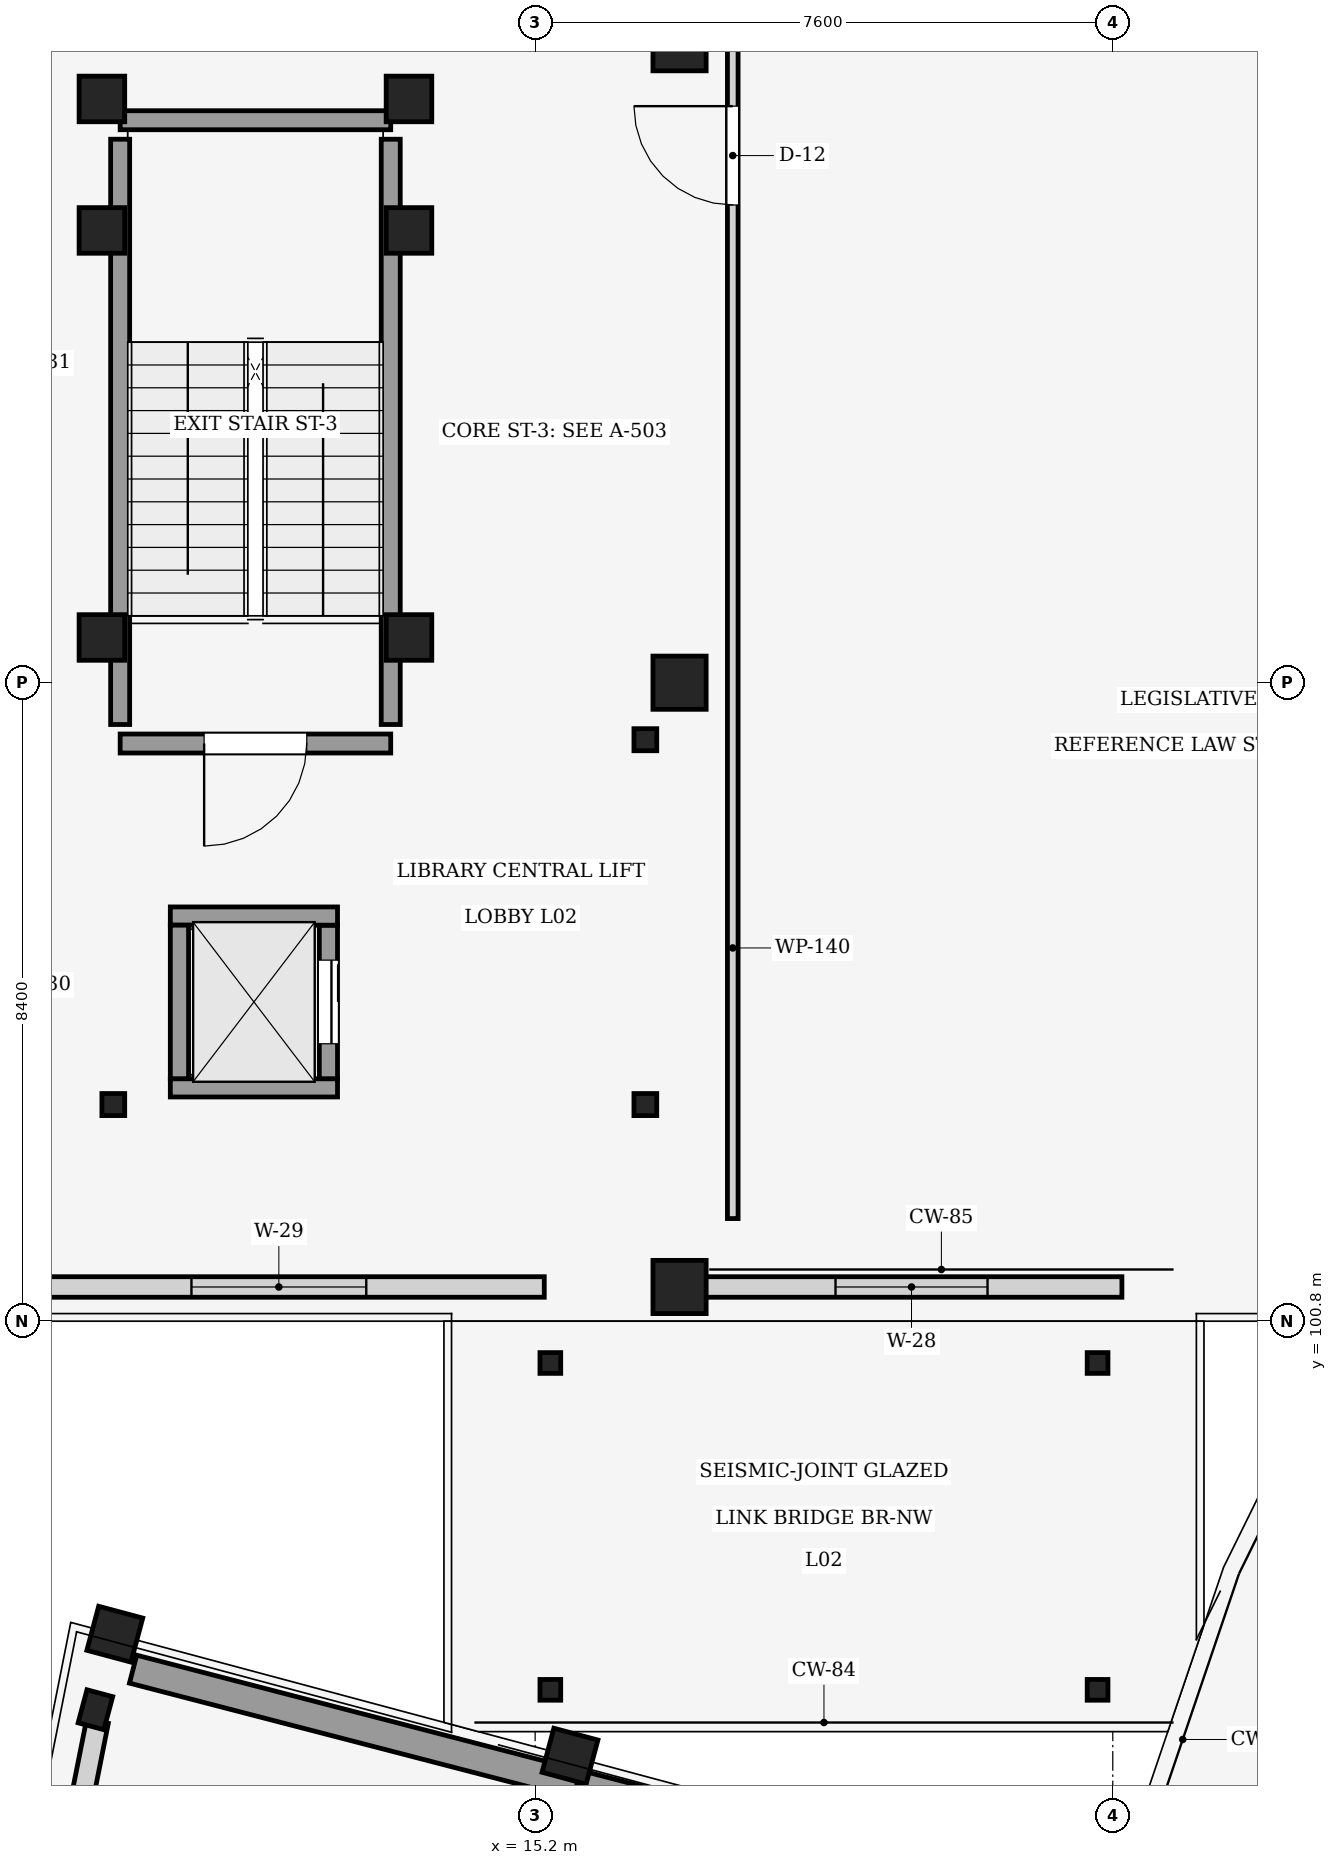
"""IFC4 building model, lengths in metres.
Left out: names, types, materials, properties, quantities, classifications, styles, units other than length and angle.
Written with IfcOpenShell. Run it as: python <this file> out.ifc"""

import sys

from ifc_helpers import new_model, si_unit, direction, frame, frame_2d, origin, origin_2d, place, context, subcontext, project, spatial, rectangle, hollow_circle, i_section, extrude, element, fill, save


model = new_model("IFC4")
c1 = context("Model", 3, precision=1e-05, world=origin(), true_north=direction((0.0, 1.0)))
c2 = subcontext(c1, "Body", "Model", "MODEL_VIEW")
j1 = project(units=[si_unit("LENGTHUNIT", "METRE"), si_unit("PLANEANGLEUNIT", "RADIAN")], contexts=[c1])
p1 = place(None, origin())
s1 = spatial("IfcSite", under=j1, at=p1, CompositionType="ELEMENT")
p2 = place(p1, origin())
s2 = spatial("IfcBuilding", under=s1, at=p2, CompositionType="ELEMENT")
p3 = place(p2, frame((0.0, 0.0, 9.15)))
s3 = spatial("IfcBuildingStorey", under=s2, at=p3, CompositionType="ELEMENT", Elevation=9.15)
for number, where, z_axis, x_axis in (
    (1, (15.658, 95.077, 0.0), (0.0, 0.0, 1.0), (-0.966, 0.259, 0.0)),
    (2, (9.67, 96.682, 0.0), (0.0, 0.0, 1.0), (-0.966, 0.259, 0.0)),
):
    element("IfcColumn", number, at=place(p3, frame(where, z_axis=z_axis, x_axis=x_axis)), inside=s3, PredefinedType="COLUMN", context=c2, shape_type="SweptSolid", body=[
        extrude(rectangle(XDim=0.6, YDim=0.6, at=origin_2d()), origin(), (0.0, 0.0, 1.0), 4.05),
    ])
p4 = place(p3, frame((9.414, 95.688, 0.0), z_axis=(0.0, 0.0, 1.0), x_axis=(-0.965925826289, 0.258819045103, 0.0)))
e3 = element("IfcColumn", 3, at=p4, inside=s3, PredefinedType="PILASTER", context=c2, shape_type="SweptSolid", body=[
    extrude(rectangle(XDim=0.35, YDim=0.45, at=origin_2d()), origin(), (0.0, 0.0, 1.0), 4.05),
])
for number, where, z_axis, x_axis in (
    (4, (17.1, 101.25, 0.0), (0.0, 0.0, 1.0), (1.0, 0.0, 0.0)),
    (5, (17.1, 109.2, 0.0), (0.0, 0.0, 1.0), (1.0, 0.0, 0.0)),
    (6, (17.1, 117.6, 0.0), (0.0, 0.0, 1.0), (1.0, 0.0, 0.0)),
):
    element("IfcColumn", number, at=place(p3, frame(where, z_axis=z_axis, x_axis=x_axis)), inside=s3, PredefinedType="COLUMN", context=c2, shape_type="SweptSolid", body=[
        extrude(rectangle(XDim=0.7, YDim=0.7, at=origin_2d()), origin(), (0.0, 0.0, 1.0), 4.05),
    ])
for number, where, z_axis, x_axis in (
    (7, (15.4, 95.95, 0.0), (0.0, 0.0, 1.0), (1.0, 0.0, 0.0)),
    (8, (22.6, 95.95, 0.0), (0.0, 0.0, 1.0), (1.0, 0.0, 0.0)),
    (9, (22.6, 100.25, 0.0), (0.0, 0.0, 1.0), (1.0, 0.0, 0.0)),
    (10, (15.4, 100.25, 0.0), (0.0, 0.0, 1.0), (1.0, 0.0, 0.0)),
):
    element("IfcColumn", number, at=place(p3, frame(where, z_axis=z_axis, x_axis=x_axis)), inside=s3, PredefinedType="COLUMN", context=c2, shape_type="SweptSolid", body=[
        extrude(hollow_circle(Radius=0.136, WallThickness=0.016, at=origin_2d()), origin(), (0.0, 0.0, 1.0), 3.82),
    ])
for number, where, z_axis, x_axis in (
    (11, (13.54, 109.795, 0.0), (0.0, 0.0, 1.0), (1.0, 0.0, 0.0)),
    (12, (9.5, 109.795, 0.0), (0.0, 0.0, 1.0), (1.0, 0.0, 0.0)),
    (13, (13.54, 115.15, 0.0), (0.0, 0.0, 1.0), (1.0, 0.0, 0.0)),
    (14, (9.5, 115.15, 0.0), (0.0, 0.0, 1.0), (1.0, 0.0, 0.0)),
    (15, (13.54, 116.88, 0.0), (0.0, 0.0, 1.0), (1.0, 0.0, 0.0)),
    (16, (9.5, 116.88, 0.0), (0.0, 0.0, 1.0), (1.0, 0.0, 0.0)),
):
    element("IfcColumn", number, at=place(p3, frame(where, z_axis=z_axis, x_axis=x_axis)), inside=s3, PredefinedType="COLUMN", context=c2, shape_type="SweptSolid", body=[
        extrude(rectangle(XDim=0.6, YDim=0.6, at=origin_2d()), origin(), (0.0, 0.0, 1.0), 4.05),
    ])
for number, where, z_axis, x_axis in (
    (17, (9.65, 103.65, 0.0), (0.0, 0.0, 1.0), (1.0, 0.0, 0.0)),
    (18, (16.65, 103.65, 0.0), (0.0, 0.0, 1.0), (1.0, 0.0, 0.0)),
    (19, (16.65, 108.45, 0.0), (0.0, 0.0, 1.0), (1.0, 0.0, 0.0)),
):
    element("IfcColumn", number, at=place(p3, frame(where, z_axis=z_axis, x_axis=x_axis)), inside=s3, PredefinedType="COLUMN", context=c2, shape_type="SweptSolid", body=[
        extrude(i_section(OverallWidth=0.3, OverallDepth=0.29, WebThickness=0.009, FlangeThickness=0.014, at=origin_2d()), origin(), (0.0, 0.0, 1.0), 4.05),
    ])
p5 = place(p3, frame((8.466, 90.631, 0.0), z_axis=(0.0, 0.0, 1.0), x_axis=(0.195083817114, 0.980786574286, 0.0)))
e20 = element("IfcWall", 20, at=p5, inside=s3, PredefinedType="STANDARD", context=c2, shape_type="SweptSolid", body=[
    extrude(rectangle(XDim=5.003, YDim=0.29, at=frame_2d((2.502, 0.0))), origin(), (0.0, 0.0, 1.0), 3.165),
])
p6 = place(p5, frame((1.927, 0.0, 0.85)))
e21 = element("IfcOpeningElement", 21, at=p6, cuts=e20, PredefinedType="OPENING", context=c2, shape_type="SweptSolid", body=[
    extrude(rectangle(XDim=1.15, YDim=1.5, at=frame_2d((0.575, 0.75))), frame((0.0, 0.155, 0.0), z_axis=(0.0, -1.0, 0.0), x_axis=(1.0, 0.0, 0.0)), (0.0, 0.0, 1.0), 0.31),
])
p7 = place(p3, frame((9.91, 96.222, 0.0), z_axis=(0.0, 0.0, 1.0), x_axis=(0.96792914822, -0.251223334956, 0.0)))
e22 = element("IfcWall", 22, at=p7, inside=s3, PredefinedType="SHEAR", context=c2, shape_type="SweptSolid", body=[
    extrude(rectangle(XDim=12.1, YDim=0.38, at=frame_2d((6.05, 0.0))), origin(), (0.0, 0.0, 1.0), 3.75),
])
p8 = place(p3, frame((22.92, 101.25, 0.0), z_axis=(0.0, 0.0, 1.0), x_axis=(-1.0, 0.0, 0.0)))
e23 = element("IfcWall", 23, at=p8, inside=s3, PredefinedType="STANDARD", context=c2, shape_type="SweptSolid", body=[
    extrude(rectangle(XDim=5.535, YDim=0.27, at=frame_2d((2.768, 0.0))), origin(), (0.0, 0.0, 1.0), 3.015),
])
p9 = place(p8, frame((1.768, 0.0, 0.85)))
e24 = element("IfcOpeningElement", 24, at=p9, cuts=e23, PredefinedType="OPENING", context=c2, shape_type="SweptSolid", body=[
    extrude(rectangle(XDim=2.0, YDim=1.85, at=frame_2d((1.0, 0.925))), frame((0.0, 0.145, 0.0), z_axis=(0.0, -1.0, 0.0), x_axis=(1.0, 0.0, 0.0)), (0.0, 0.0, 1.0), 0.29),
])
p10 = place(p3, frame((15.32, 101.25, 0.0), z_axis=(0.0, 0.0, 1.0), x_axis=(-1.0, 0.0, 0.0)))
e25 = element("IfcWall", 25, at=p10, inside=s3, PredefinedType="STANDARD", context=c2, shape_type="SweptSolid", body=[
    extrude(rectangle(XDim=6.985, YDim=0.27, at=frame_2d((3.493, 0.0))), origin(), (0.0, 0.0, 1.0), 3.015),
])
p11 = place(p10, frame((2.342, 0.0, 0.85)))
e26 = element("IfcOpeningElement", 26, at=p11, cuts=e25, PredefinedType="OPENING", context=c2, shape_type="SweptSolid", body=[
    extrude(rectangle(XDim=2.3, YDim=1.85, at=frame_2d((1.15, 0.925))), frame((0.0, 0.145, 0.0), z_axis=(0.0, -1.0, 0.0), x_axis=(1.0, 0.0, 0.0)), (0.0, 0.0, 1.0), 0.29),
])
p12 = place(p3, frame((13.3, 108.4, 0.0), z_axis=(0.0, 0.0, 1.0), x_axis=(-1.0, 0.0, 0.0)))
e27 = element("IfcWall", 27, at=p12, inside=s3, PredefinedType="SHEAR", context=c2, shape_type="SweptSolid", body=[
    extrude(rectangle(XDim=3.56, YDim=0.25, at=frame_2d((1.78, 0.0))), origin(), (0.0, 0.0, 1.0), 4.05),
])
p13 = place(p12, frame((1.105, 0.0, 0.0)))
e28 = element("IfcOpeningElement", 28, at=p13, cuts=e27, PredefinedType="OPENING", context=c2, shape_type="SweptSolid", body=[
    extrude(rectangle(XDim=1.35, YDim=2.2, at=frame_2d((0.675, 1.1))), frame((0.0, 0.135, 0.0), z_axis=(0.0, -1.0, 0.0), x_axis=(1.0, 0.0, 0.0)), (0.0, 0.0, 1.0), 0.27),
])
p14 = place(p3, frame((9.74, 108.65, 0.0), z_axis=(0.0, 0.0, 1.0), x_axis=(0.0, 1.0, 0.0)))
e29 = element("IfcWall", 29, at=p14, inside=s3, PredefinedType="SHEAR", context=c2, shape_type="SweptSolid", body=[
    extrude(rectangle(XDim=7.7, YDim=0.25, at=frame_2d((3.85, 0.0))), origin(), (0.0, 0.0, 1.0), 4.05),
])
p15 = place(p3, frame((9.74, 116.6, 0.0), z_axis=(0.0, 0.0, 1.0), x_axis=(1.0, 0.0, 0.0)))
e30 = element("IfcWall", 30, at=p15, inside=s3, PredefinedType="SHEAR", context=c2, shape_type="SweptSolid", body=[
    extrude(rectangle(XDim=3.56, YDim=0.25, at=frame_2d((1.78, 0.0))), origin(), (0.0, 0.0, 1.0), 4.05),
])
p16 = place(p3, frame((13.3, 116.35, 0.0), z_axis=(0.0, 0.0, 1.0), x_axis=(0.0, -1.0, 0.0)))
e31 = element("IfcWall", 31, at=p16, inside=s3, PredefinedType="SHEAR", context=c2, shape_type="SweptSolid", body=[
    extrude(rectangle(XDim=7.7, YDim=0.25, at=frame_2d((3.85, 0.0))), origin(), (0.0, 0.0, 1.0), 4.05),
])
p17 = place(p3, frame((12.6, 103.87, 0.0), z_axis=(0.0, 0.0, 1.0), x_axis=(-1.0, 0.0, 0.0)))
e32 = element("IfcWall", 32, at=p17, inside=s3, PredefinedType="SHEAR", context=c2, shape_type="SweptSolid", body=[
    extrude(rectangle(XDim=2.2, YDim=0.24, at=frame_2d((1.1, 0.0))), origin(), (0.0, 0.0, 1.0), 4.05),
])
p18 = place(p3, frame((12.48, 106.01, 0.0), z_axis=(0.0, 0.0, 1.0), x_axis=(0.0, -1.0, 0.0)))
e33 = element("IfcWall", 33, at=p18, inside=s3, PredefinedType="SHEAR", context=c2, shape_type="SweptSolid", body=[
    extrude(rectangle(XDim=2.02, YDim=0.24, at=frame_2d((1.01, 0.0))), origin(), (0.0, 0.0, 1.0), 4.05),
])
p19 = place(p18, frame((0.46, 0.0, 0.0)))
e34 = element("IfcOpeningElement", 34, at=p19, cuts=e33, PredefinedType="OPENING", context=c2, shape_type="SweptSolid", body=[
    extrude(rectangle(XDim=1.1, YDim=2.15, at=frame_2d((0.55, 1.075))), frame((0.0, 0.13, 0.0), z_axis=(0.0, -1.0, 0.0), x_axis=(1.0, 0.0, 0.0)), (0.0, 0.0, 1.0), 0.26),
])
p20 = place(p3, frame((10.4, 106.13, 0.0), z_axis=(0.0, 0.0, 1.0), x_axis=(1.0, 0.0, 0.0)))
e35 = element("IfcWall", 35, at=p20, inside=s3, PredefinedType="SHEAR", context=c2, shape_type="SweptSolid", body=[
    extrude(rectangle(XDim=2.2, YDim=0.24, at=frame_2d((1.1, 0.0))), origin(), (0.0, 0.0, 1.0), 4.05),
])
p21 = place(p3, frame((10.52, 103.99, 0.0), z_axis=(0.0, 0.0, 1.0), x_axis=(0.0, 1.0, 0.0)))
e36 = element("IfcWall", 36, at=p21, inside=s3, PredefinedType="SHEAR", context=c2, shape_type="SweptSolid", body=[
    extrude(rectangle(XDim=2.02, YDim=0.24, at=frame_2d((1.01, 0.0))), origin(), (0.0, 0.0, 1.0), 4.05),
])
p22 = place(p3, frame((17.8, 102.15, 0.0), z_axis=(0.0, 0.0, 1.0), x_axis=(0.0, 1.0, 0.0)))
e37 = element("IfcWall", 37, at=p22, inside=s3, PredefinedType="PARTITIONING", context=c2, shape_type="SweptSolid", body=[
    extrude(rectangle(XDim=29.67, YDim=0.14, at=frame_2d((14.835, 0.0))), origin(), (0.0, 0.0, 1.0), 3.015),
])
p23 = place(p22, frame((13.335, 0.0, 0.0)))
e38 = element("IfcOpeningElement", 38, at=p23, cuts=e37, PredefinedType="OPENING", context=c2, shape_type="SweptSolid", body=[
    extrude(rectangle(XDim=1.3, YDim=2.22, at=frame_2d((0.65, 1.11))), frame((0.0, 0.08, 0.0), z_axis=(0.0, -1.0, 0.0), x_axis=(1.0, 0.0, 0.0)), (0.0, 0.0, 1.0), 0.16),
])
p24 = place(p9, origin())
e39 = element("IfcWindow", 39, at=p24, inside=s3, PartitioningType="SINGLE_PANEL", PredefinedType="WINDOW", context=c2, shape_type="SweptSolid", body=[
    extrude(rectangle(XDim=2.0, YDim=1.85, at=frame_2d((1.0, 0.925))), frame((0.0, 0.03, 0.0), z_axis=(0.0, -1.0, 0.0), x_axis=(1.0, 0.0, 0.0)), (0.0, 0.0, 1.0), 0.06),
])
fill(e24, e39)
p25 = place(p11, origin())
e40 = element("IfcWindow", 40, at=p25, inside=s3, PartitioningType="SINGLE_PANEL", PredefinedType="WINDOW", context=c2, shape_type="SweptSolid", body=[
    extrude(rectangle(XDim=2.3, YDim=1.85, at=frame_2d((1.15, 0.925))), frame((0.0, 0.03, 0.0), z_axis=(0.0, -1.0, 0.0), x_axis=(1.0, 0.0, 0.0)), (0.0, 0.0, 1.0), 0.06),
])
fill(e26, e40)
p26 = place(p13, origin())
e41 = element("IfcDoor", 41, at=p26, inside=s3, OperationType="SINGLE_SWING_RIGHT", PredefinedType="DOOR", context=c2, shape_type="SweptSolid", body=[
    extrude(rectangle(XDim=1.35, YDim=2.2, at=frame_2d((0.675, 1.1))), frame((0.0, 0.025, 0.0), z_axis=(0.0, -1.0, 0.0), x_axis=(1.0, 0.0, 0.0)), (0.0, 0.0, 1.0), 0.05),
])
fill(e28, e41)
p27 = place(p19, origin())
e42 = element("IfcDoor", 42, at=p27, inside=s3, OperationType="SLIDING_TO_LEFT", PredefinedType="DOOR", context=c2, shape_type="SweptSolid", body=[
    extrude(rectangle(XDim=1.1, YDim=2.15, at=frame_2d((0.55, 1.075))), frame((0.0, 0.025, 0.0), z_axis=(0.0, -1.0, 0.0), x_axis=(1.0, 0.0, 0.0)), (0.0, 0.0, 1.0), 0.05),
])
fill(e34, e42)
p28 = place(p23, origin())
e43 = element("IfcDoor", 43, at=p28, inside=s3, OperationType="SINGLE_SWING_RIGHT", PredefinedType="DOOR", context=c2, shape_type="SweptSolid", body=[
    extrude(rectangle(XDim=1.3, YDim=2.22, at=frame_2d((0.65, 1.11))), frame((0.0, 0.025, 0.0), z_axis=(0.0, -1.0, 0.0), x_axis=(1.0, 0.0, 0.0)), (0.0, 0.0, 1.0), 0.05),
])
fill(e38, e43)
save(model, sys.argv[1])
